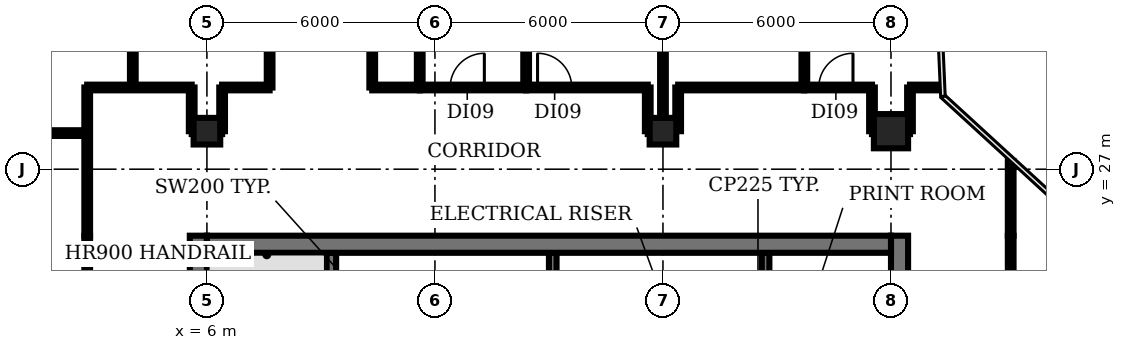
"""IFC4 building model, lengths in metres.
Left out: names, types, materials, properties, quantities, classifications, styles, units other than length and angle.
Written with IfcOpenShell. Run it as: python <this file> out.ifc"""

import sys

from ifc_helpers import new_model, si_unit, direction, frame, frame_2d, origin, origin_2d, place, context, subcontext, project, spatial, rectangle, circle, extrude, element, fill, save


model = new_model("IFC4")
c1 = context("Model", 3, precision=1e-05, world=origin(), true_north=direction((0.0, 1.0)))
c2 = subcontext(c1, "Body", "Model", "MODEL_VIEW")
j1 = project(units=[si_unit("LENGTHUNIT", "METRE"), si_unit("PLANEANGLEUNIT", "RADIAN")], contexts=[c1])
p1 = place(None, origin())
s1 = spatial("IfcSite", under=j1, at=p1, CompositionType="ELEMENT")
p2 = place(p1, origin())
s2 = spatial("IfcBuilding", under=s1, at=p2, CompositionType="ELEMENT")
p3 = place(p2, frame((0.0, 0.0, 218.0)))
s3 = spatial("IfcBuildingStorey", under=s2, at=p3, CompositionType="ELEMENT", Elevation=218.0)
for number, where, z_axis, x_axis in (
    (1, (6.0, 28.0, 0.0), (0.0, 0.0, 1.0), (1.0, 0.0, 0.0)),
    (2, (18.0, 28.0, 0.0), (0.0, 0.0, 1.0), (1.0, 0.0, 0.0)),
):
    element("IfcColumn", number, at=place(p3, frame(where, z_axis=z_axis, x_axis=x_axis)), inside=s3, PredefinedType="COLUMN", context=c2, shape_type="SweptSolid", body=[
        extrude(rectangle(XDim=0.7, YDim=0.7, at=origin_2d()), origin(), (0.0, 0.0, 1.0), 3.85),
    ])
p4 = place(p3, frame((24.0, 28.0, 0.0), z_axis=(0.0, 0.0, 1.0), x_axis=(1.0, 0.0, 0.0)))
e3 = element("IfcColumn", 3, at=p4, inside=s3, PredefinedType="COLUMN", context=c2, shape_type="SweptSolid", body=[
    extrude(circle(Radius=0.45, at=origin_2d()), origin(), (0.0, 0.0, 1.0), 3.85),
])
p5 = place(p3, frame((9.275, 18.375, 0.0), z_axis=(0.0, 0.0, 1.0), x_axis=(0.0, 1.0, 0.0)))
e4 = element("IfcWall", 4, at=p5, inside=s3, PredefinedType="SHEAR", context=c2, shape_type="SweptSolid", body=[
    extrude(rectangle(XDim=6.425, YDim=0.25, at=frame_2d((3.212, 0.0))), origin(), (0.0, 0.0, 1.0), 3.85),
])
for number, where, z_axis, x_axis in (
    (5, (15.1, 22.9, 0.0), (0.0, 0.0, 1.0), (0.0, 1.0, 0.0)),
    (6, (20.7, 22.9, 0.0), (0.0, 0.0, 1.0), (0.0, 1.0, 0.0)),
):
    element("IfcWall", number, at=place(p3, frame(where, z_axis=z_axis, x_axis=x_axis)), inside=s3, PredefinedType="SHEAR", context=c2, shape_type="SweptSolid", body=[
        extrude(rectangle(XDim=1.9, YDim=0.2, at=frame_2d((0.95, 0.0))), origin(), (0.0, 0.0, 1.0), 3.85),
    ])
p6 = place(p3, frame((5.775, 4.42, 0.0), z_axis=(0.0, 0.0, 1.0), x_axis=(0.0, 1.0, 0.0)))
e7 = element("IfcWall", 7, at=p6, inside=s3, PredefinedType="SHEAR", context=c2, shape_type="SweptSolid", body=[
    extrude(rectangle(XDim=20.83, YDim=0.45, at=frame_2d((10.415, 0.0))), origin(), (0.0, 0.0, 1.0), 3.85),
])
p7 = place(p6, frame((1.23, 0.0, 0.0)))
e8 = element("IfcOpeningElement", 8, at=p7, cuts=e7, PredefinedType="OPENING", context=c2, shape_type="SweptSolid", body=[
    extrude(rectangle(XDim=1.5, YDim=2.1, at=frame_2d((0.75, 1.05))), frame((0.0, 0.235, 0.0), z_axis=(0.0, -1.0, 0.0), x_axis=(1.0, 0.0, 0.0)), (0.0, 0.0, 1.0), 0.47),
])
p8 = place(p6, frame((7.68, 0.0, 0.0)))
e9 = element("IfcOpeningElement", 9, at=p8, cuts=e7, PredefinedType="OPENING", context=c2, shape_type="SweptSolid", body=[
    extrude(rectangle(XDim=1.2, YDim=2.1, at=frame_2d((0.6, 1.05))), frame((0.0, 0.235, 0.0), z_axis=(0.0, -1.0, 0.0), x_axis=(1.0, 0.0, 0.0)), (0.0, 0.0, 1.0), 0.47),
])
p9 = place(p6, frame((14.23, 0.0, 0.0)))
e10 = element("IfcOpeningElement", 10, at=p9, cuts=e7, PredefinedType="OPENING", context=c2, shape_type="SweptSolid", body=[
    extrude(rectangle(XDim=1.2, YDim=2.1, at=frame_2d((0.6, 1.05))), frame((0.0, 0.235, 0.0), z_axis=(0.0, -1.0, 0.0), x_axis=(1.0, 0.0, 0.0)), (0.0, 0.0, 1.0), 0.47),
])
p10 = place(p3, frame((24.225, 25.25, 0.0), z_axis=(0.0, 0.0, 1.0), x_axis=(0.0, -1.0, 0.0)))
e11 = element("IfcWall", 11, at=p10, inside=s3, PredefinedType="SHEAR", context=c2, shape_type="SweptSolid", body=[
    extrude(rectangle(XDim=20.83, YDim=0.45, at=frame_2d((10.415, 0.0))), origin(), (0.0, 0.0, 1.0), 3.85),
])
p11 = place(p10, frame((18.1, 0.0, 0.0)))
e12 = element("IfcOpeningElement", 12, at=p11, cuts=e11, PredefinedType="OPENING", context=c2, shape_type="SweptSolid", body=[
    extrude(rectangle(XDim=1.5, YDim=2.1, at=frame_2d((0.75, 1.05))), frame((0.0, 0.235, 0.0), z_axis=(0.0, -1.0, 0.0), x_axis=(1.0, 0.0, 0.0)), (0.0, 0.0, 1.0), 0.47),
])
p12 = place(p10, frame((12.0, 0.0, 0.0)))
e13 = element("IfcOpeningElement", 13, at=p12, cuts=e11, PredefinedType="OPENING", context=c2, shape_type="SweptSolid", body=[
    extrude(rectangle(XDim=0.9, YDim=2.1, at=frame_2d((0.45, 1.05))), frame((0.0, 0.235, 0.0), z_axis=(0.0, -1.0, 0.0), x_axis=(1.0, 0.0, 0.0)), (0.0, 0.0, 1.0), 0.47),
])
p13 = place(p10, frame((6.0, 0.0, 0.0)))
e14 = element("IfcOpeningElement", 14, at=p13, cuts=e11, PredefinedType="OPENING", context=c2, shape_type="SweptSolid", body=[
    extrude(rectangle(XDim=2.0, YDim=2.1, at=frame_2d((1.0, 1.05))), frame((0.0, 0.235, 0.0), z_axis=(0.0, -1.0, 0.0), x_axis=(1.0, 0.0, 0.0)), (0.0, 0.0, 1.0), 0.47),
])
p14 = place(p3, frame((6.0, 25.025, 0.0), z_axis=(0.0, 0.0, 1.0), x_axis=(1.0, 0.0, 0.0)))
e15 = element("IfcWall", 15, at=p14, inside=s3, PredefinedType="SHEAR", context=c2, shape_type="SweptSolid", body=[
    extrude(rectangle(XDim=18.0, YDim=0.45, at=frame_2d((9.0, 0.0))), origin(), (0.0, 0.0, 1.0), 3.85),
])
p15 = place(p3, frame((-0.965, 27.95, 0.0), z_axis=(0.0, 0.0, 1.0), x_axis=(1.0, 0.0, 0.0)))
e16 = element("IfcWall", 16, at=p15, inside=s3, PredefinedType="PARTITIONING", context=c2, shape_type="SweptSolid", body=[
    extrude(rectangle(XDim=3.815, YDim=0.15, at=frame_2d((1.908, 0.0))), origin(), (0.0, 0.0, 1.0), 2.88),
])
p16 = place(p3, frame((2.85, 5.77, 0.0), z_axis=(0.0, 0.0, 1.0), x_axis=(0.0, 1.0, 0.0)))
e17 = element("IfcWall", 17, at=p16, inside=s3, PredefinedType="PARTITIONING", context=c2, shape_type="SweptSolid", body=[
    extrude(rectangle(XDim=19.48, YDim=0.15, at=frame_2d((9.74, 0.0))), origin(), (0.0, 0.0, 1.0), 2.88),
])
p17 = place(p16, frame((8.48, 0.0, 0.0)))
e18 = element("IfcOpeningElement", 18, at=p17, cuts=e17, PredefinedType="OPENING", context=c2, shape_type="SweptSolid", body=[
    extrude(rectangle(XDim=1.2, YDim=2.1, at=frame_2d((0.6, 1.05))), frame((0.0, 0.085, 0.0), z_axis=(0.0, -1.0, 0.0), x_axis=(1.0, 0.0, 0.0)), (0.0, 0.0, 1.0), 0.17),
])
p18 = place(p3, frame((2.85, 25.25, 0.0), z_axis=(0.0, 0.0, 1.0), x_axis=(0.0, 1.0, 0.0)))
e19 = element("IfcWall", 19, at=p18, inside=s3, PredefinedType="PARTITIONING", context=c2, shape_type="SweptSolid", body=[
    extrude(rectangle(XDim=3.9, YDim=0.15, at=frame_2d((1.95, 0.0))), origin(), (0.0, 0.0, 1.0), 2.88),
])
p19 = place(p3, frame((2.85, 29.15, 0.0), z_axis=(0.0, 0.0, 1.0), x_axis=(1.0, 0.0, 0.0)))
e20 = element("IfcWall", 20, at=p19, inside=s3, PredefinedType="PARTITIONING", context=c2, shape_type="SweptSolid", body=[
    extrude(rectangle(XDim=2.75, YDim=0.15, at=frame_2d((1.375, 0.0))), origin(), (0.0, 0.0, 1.0), 2.88),
])
p20 = place(p3, frame((4.05, 29.15, 0.0), z_axis=(0.0, 0.0, 1.0), x_axis=(0.0, 1.0, 0.0)))
e21 = element("IfcWall", 21, at=p20, inside=s3, PredefinedType="PARTITIONING", context=c2, shape_type="SweptSolid", body=[
    extrude(rectangle(XDim=4.8, YDim=0.15, at=frame_2d((2.4, 0.0))), origin(), (0.0, 0.0, 1.0), 2.88),
])
p21 = place(p3, frame((5.6, 28.0, 0.0), z_axis=(0.0, 0.0, 1.0), x_axis=(0.0, 1.0, 0.0)))
e22 = element("IfcWall", 22, at=p21, inside=s3, PredefinedType="PARTITIONING", context=c2, shape_type="SweptSolid", body=[
    extrude(rectangle(XDim=1.15, YDim=0.15, at=frame_2d((0.575, 0.0))), origin(), (0.0, 0.0, 1.0), 2.88),
])
p22 = place(p3, frame((5.6, 28.0, 0.0), z_axis=(0.0, 0.0, 1.0), x_axis=(1.0, 0.0, 0.0)))
e23 = element("IfcWall", 23, at=p22, inside=s3, PredefinedType="PARTITIONING", context=c2, shape_type="SweptSolid", body=[
    extrude(rectangle(XDim=0.8, YDim=0.15, at=frame_2d((0.4, 0.0))), origin(), (0.0, 0.0, 1.0), 2.88),
])
p23 = place(p3, frame((6.4, 28.0, 0.0), z_axis=(0.0, 0.0, 1.0), x_axis=(0.0, 1.0, 0.0)))
e24 = element("IfcWall", 24, at=p23, inside=s3, PredefinedType="PARTITIONING", context=c2, shape_type="SweptSolid", body=[
    extrude(rectangle(XDim=1.15, YDim=0.15, at=frame_2d((0.575, 0.0))), origin(), (0.0, 0.0, 1.0), 2.88),
])
p24 = place(p3, frame((6.4, 29.15, 0.0), z_axis=(0.0, 0.0, 1.0), x_axis=(1.0, 0.0, 0.0)))
e25 = element("IfcWall", 25, at=p24, inside=s3, PredefinedType="PARTITIONING", context=c2, shape_type="SweptSolid", body=[
    extrude(rectangle(XDim=1.25, YDim=0.15, at=frame_2d((0.625, 0.0))), origin(), (0.0, 0.0, 1.0), 2.88),
])
p25 = place(p3, frame((7.65, 29.15, 0.0), z_axis=(0.0, 0.0, 1.0), x_axis=(0.0, 1.0, 0.0)))
e26 = element("IfcWall", 26, at=p25, inside=s3, PredefinedType="PARTITIONING", context=c2, shape_type="SweptSolid", body=[
    extrude(rectangle(XDim=4.8, YDim=0.15, at=frame_2d((2.4, 0.0))), origin(), (0.0, 0.0, 1.0), 2.88),
])
p26 = place(p25, frame((1.9, 0.0, 0.0)))
e27 = element("IfcOpeningElement", 27, at=p26, cuts=e26, PredefinedType="OPENING", context=c2, shape_type="SweptSolid", body=[
    extrude(rectangle(XDim=0.9, YDim=2.1, at=frame_2d((0.45, 1.05))), frame((0.0, 0.085, 0.0), z_axis=(0.0, -1.0, 0.0), x_axis=(1.0, 0.0, 0.0)), (0.0, 0.0, 1.0), 0.17),
])
p27 = place(p3, frame((10.35, 29.15, 0.0), z_axis=(0.0, 0.0, 1.0), x_axis=(0.0, 1.0, 0.0)))
e28 = element("IfcWall", 28, at=p27, inside=s3, PredefinedType="PARTITIONING", context=c2, shape_type="SweptSolid", body=[
    extrude(rectangle(XDim=4.8, YDim=0.15, at=frame_2d((2.4, 0.0))), origin(), (0.0, 0.0, 1.0), 2.88),
])
p28 = place(p3, frame((10.35, 29.15, 0.0), z_axis=(0.0, 0.0, 1.0), x_axis=(1.0, 0.0, 0.0)))
e29 = element("IfcWall", 29, at=p28, inside=s3, PredefinedType="PARTITIONING", context=c2, shape_type="SweptSolid", body=[
    extrude(rectangle(XDim=1.25, YDim=0.15, at=frame_2d((0.625, 0.0))), origin(), (0.0, 0.0, 1.0), 2.88),
])
p29 = place(p3, frame((11.6, 29.15, 0.0), z_axis=(0.0, 0.0, 1.0), x_axis=(0.0, 1.0, 0.0)))
e30 = element("IfcWall", 30, at=p29, inside=s3, PredefinedType="PARTITIONING", context=c2, shape_type="SweptSolid", body=[
    extrude(rectangle(XDim=4.72, YDim=0.15, at=frame_2d((2.36, 0.0))), origin(), (0.0, 0.0, 1.0), 2.88),
])
p30 = place(p3, frame((11.6, 29.15, 0.0), z_axis=(0.0, 0.0, 1.0), x_axis=(1.0, 0.0, 0.0)))
e31 = element("IfcWall", 31, at=p30, inside=s3, PredefinedType="PARTITIONING", context=c2, shape_type="SweptSolid", body=[
    extrude(rectangle(XDim=2.8, YDim=0.15, at=frame_2d((1.4, 0.0))), origin(), (0.0, 0.0, 1.0), 2.88),
])
p31 = place(p30, frame((0.8, 0.0, 0.0)))
e32 = element("IfcOpeningElement", 32, at=p31, cuts=e31, PredefinedType="OPENING", context=c2, shape_type="SweptSolid", body=[
    extrude(rectangle(XDim=0.9, YDim=2.1, at=frame_2d((0.45, 1.05))), frame((0.0, 0.085, 0.0), z_axis=(0.0, -1.0, 0.0), x_axis=(1.0, 0.0, 0.0)), (0.0, 0.0, 1.0), 0.17),
])
p32 = place(p3, frame((14.4, 29.15, 0.0), z_axis=(0.0, 0.0, 1.0), x_axis=(0.0, 1.0, 0.0)))
e33 = element("IfcWall", 33, at=p32, inside=s3, PredefinedType="PARTITIONING", context=c2, shape_type="SweptSolid", body=[
    extrude(rectangle(XDim=4.8, YDim=0.15, at=frame_2d((2.4, 0.0))), origin(), (0.0, 0.0, 1.0), 2.88),
])
p33 = place(p3, frame((14.4, 29.15, 0.0), z_axis=(0.0, 0.0, 1.0), x_axis=(1.0, 0.0, 0.0)))
e34 = element("IfcWall", 34, at=p33, inside=s3, PredefinedType="PARTITIONING", context=c2, shape_type="SweptSolid", body=[
    extrude(rectangle(XDim=3.2, YDim=0.15, at=frame_2d((1.6, 0.0))), origin(), (0.0, 0.0, 1.0), 2.88),
])
p34 = place(p33, frame((0.3, 0.0, 0.0)))
e35 = element("IfcOpeningElement", 35, at=p34, cuts=e34, PredefinedType="OPENING", context=c2, shape_type="SweptSolid", body=[
    extrude(rectangle(XDim=0.9, YDim=2.1, at=frame_2d((0.45, 1.05))), frame((0.0, 0.085, 0.0), z_axis=(0.0, -1.0, 0.0), x_axis=(1.0, 0.0, 0.0)), (0.0, 0.0, 1.0), 0.17),
])
p35 = place(p3, frame((17.6, 28.0, 0.0), z_axis=(0.0, 0.0, 1.0), x_axis=(0.0, 1.0, 0.0)))
e36 = element("IfcWall", 36, at=p35, inside=s3, PredefinedType="PARTITIONING", context=c2, shape_type="SweptSolid", body=[
    extrude(rectangle(XDim=1.15, YDim=0.15, at=frame_2d((0.575, 0.0))), origin(), (0.0, 0.0, 1.0), 2.88),
])
p36 = place(p3, frame((17.6, 28.0, 0.0), z_axis=(0.0, 0.0, 1.0), x_axis=(1.0, 0.0, 0.0)))
e37 = element("IfcWall", 37, at=p36, inside=s3, PredefinedType="PARTITIONING", context=c2, shape_type="SweptSolid", body=[
    extrude(rectangle(XDim=0.4, YDim=0.15, at=frame_2d((0.2, 0.0))), origin(), (0.0, 0.0, 1.0), 2.88),
])
p37 = place(p3, frame((18.0, 28.0, 0.0), z_axis=(0.0, 0.0, 1.0), x_axis=(0.0, 1.0, 0.0)))
e38 = element("IfcWall", 38, at=p37, inside=s3, PredefinedType="PARTITIONING", context=c2, shape_type="SweptSolid", body=[
    extrude(rectangle(XDim=5.95, YDim=0.15, at=frame_2d((2.975, 0.0))), origin(), (0.0, 0.0, 1.0), 2.88),
])
p38 = place(p3, frame((18.4, 28.0, 0.0), z_axis=(0.0, 0.0, 1.0), x_axis=(0.0, 1.0, 0.0)))
e39 = element("IfcWall", 39, at=p38, inside=s3, PredefinedType="PARTITIONING", context=c2, shape_type="SweptSolid", body=[
    extrude(rectangle(XDim=1.15, YDim=0.15, at=frame_2d((0.575, 0.0))), origin(), (0.0, 0.0, 1.0), 2.88),
])
p39 = place(p3, frame((18.4, 29.15, 0.0), z_axis=(0.0, 0.0, 1.0), x_axis=(1.0, 0.0, 0.0)))
e40 = element("IfcWall", 40, at=p39, inside=s3, PredefinedType="PARTITIONING", context=c2, shape_type="SweptSolid", body=[
    extrude(rectangle(XDim=3.32, YDim=0.15, at=frame_2d((1.66, 0.0))), origin(), (0.0, 0.0, 1.0), 2.88),
])
p40 = place(p3, frame((21.72, 29.15, 0.0), z_axis=(0.0, 0.0, 1.0), x_axis=(0.0, 1.0, 0.0)))
e41 = element("IfcWall", 41, at=p40, inside=s3, PredefinedType="PARTITIONING", context=c2, shape_type="SweptSolid", body=[
    extrude(rectangle(XDim=4.8, YDim=0.15, at=frame_2d((2.4, 0.0))), origin(), (0.0, 0.0, 1.0), 2.88),
])
p41 = place(p3, frame((21.72, 29.15, 0.0), z_axis=(0.0, 0.0, 1.0), x_axis=(1.0, 0.0, 0.0)))
e42 = element("IfcWall", 42, at=p41, inside=s3, PredefinedType="PARTITIONING", context=c2, shape_type="SweptSolid", body=[
    extrude(rectangle(XDim=1.78, YDim=0.15, at=frame_2d((0.89, 0.0))), origin(), (0.0, 0.0, 1.0), 2.88),
])
p42 = place(p41, frame((0.38, 0.0, 0.0)))
e43 = element("IfcOpeningElement", 43, at=p42, cuts=e42, PredefinedType="OPENING", context=c2, shape_type="SweptSolid", body=[
    extrude(rectangle(XDim=0.9, YDim=2.1, at=frame_2d((0.45, 1.05))), frame((0.0, 0.085, 0.0), z_axis=(0.0, -1.0, 0.0), x_axis=(1.0, 0.0, 0.0)), (0.0, 0.0, 1.0), 0.17),
])
p43 = place(p3, frame((23.5, 28.0, 0.0), z_axis=(0.0, 0.0, 1.0), x_axis=(0.0, 1.0, 0.0)))
e44 = element("IfcWall", 44, at=p43, inside=s3, PredefinedType="PARTITIONING", context=c2, shape_type="SweptSolid", body=[
    extrude(rectangle(XDim=1.15, YDim=0.15, at=frame_2d((0.575, 0.0))), origin(), (0.0, 0.0, 1.0), 2.88),
])
p44 = place(p3, frame((23.5, 28.0, 0.0), z_axis=(0.0, 0.0, 1.0), x_axis=(1.0, 0.0, 0.0)))
e45 = element("IfcWall", 45, at=p44, inside=s3, PredefinedType="PARTITIONING", context=c2, shape_type="SweptSolid", body=[
    extrude(rectangle(XDim=1.0, YDim=0.15, at=frame_2d((0.5, 0.0))), origin(), (0.0, 0.0, 1.0), 2.88),
])
p45 = place(p3, frame((24.5, 28.0, 0.0), z_axis=(0.0, 0.0, 1.0), x_axis=(0.0, 1.0, 0.0)))
e46 = element("IfcWall", 46, at=p45, inside=s3, PredefinedType="PARTITIONING", context=c2, shape_type="SweptSolid", body=[
    extrude(rectangle(XDim=1.15, YDim=0.15, at=frame_2d((0.575, 0.0))), origin(), (0.0, 0.0, 1.0), 2.88),
])
p46 = place(p3, frame((24.5, 29.15, 0.0), z_axis=(0.0, 0.0, 1.0), x_axis=(1.0, 0.0, 0.0)))
e47 = element("IfcWall", 47, at=p46, inside=s3, PredefinedType="PARTITIONING", context=c2, shape_type="SweptSolid", body=[
    extrude(rectangle(XDim=0.796, YDim=0.15, at=frame_2d((0.398, 0.0))), origin(), (0.0, 0.0, 1.0), 2.88),
])
p47 = place(p3, frame((27.15, 25.25, 0.0), z_axis=(0.0, 0.0, 1.0), x_axis=(0.0, -1.0, 0.0)))
e48 = element("IfcWall", 48, at=p47, inside=s3, PredefinedType="PARTITIONING", context=c2, shape_type="SweptSolid", body=[
    extrude(rectangle(XDim=4.85, YDim=0.15, at=frame_2d((2.425, 0.0))), origin(), (0.0, 0.0, 1.0), 2.88),
])
p48 = place(p47, frame((1.55, 0.0, 0.0)))
e49 = element("IfcOpeningElement", 49, at=p48, cuts=e48, PredefinedType="OPENING", context=c2, shape_type="SweptSolid", body=[
    extrude(rectangle(XDim=1.0, YDim=2.1, at=frame_2d((0.5, 1.05))), frame((0.0, 0.085, 0.0), z_axis=(0.0, -1.0, 0.0), x_axis=(1.0, 0.0, 0.0)), (0.0, 0.0, 1.0), 0.17),
])
p49 = place(p3, frame((27.15, 25.25, 0.0), z_axis=(0.0, 0.0, 1.0), x_axis=(0.0, 1.0, 0.0)))
e50 = element("IfcWall", 50, at=p49, inside=s3, PredefinedType="PARTITIONING", context=c2, shape_type="SweptSolid", body=[
    extrude(rectangle(XDim=1.96, YDim=0.15, at=frame_2d((0.98, 0.0))), origin(), (0.0, 0.0, 1.0), 2.88),
])
p50 = place(p31, origin())
e51 = element("IfcDoor", 51, at=p50, inside=s3, OperationType="SINGLE_SWING_RIGHT", PredefinedType="DOOR", context=c2, shape_type="SweptSolid", body=[
    extrude(rectangle(XDim=0.9, YDim=2.1, at=frame_2d((0.45, 1.05))), frame((0.0, 0.025, 0.0), z_axis=(0.0, -1.0, 0.0), x_axis=(1.0, 0.0, 0.0)), (0.0, 0.0, 1.0), 0.05),
])
fill(e32, e51)
p51 = place(p34, origin())
e52 = element("IfcDoor", 52, at=p51, inside=s3, OperationType="SINGLE_SWING_LEFT", PredefinedType="DOOR", context=c2, shape_type="SweptSolid", body=[
    extrude(rectangle(XDim=0.9, YDim=2.1, at=frame_2d((0.45, 1.05))), frame((0.0, 0.025, 0.0), z_axis=(0.0, -1.0, 0.0), x_axis=(1.0, 0.0, 0.0)), (0.0, 0.0, 1.0), 0.05),
])
fill(e35, e52)
p52 = place(p42, origin())
e53 = element("IfcDoor", 53, at=p52, inside=s3, OperationType="SINGLE_SWING_RIGHT", PredefinedType="DOOR", context=c2, shape_type="SweptSolid", body=[
    extrude(rectangle(XDim=0.9, YDim=2.1, at=frame_2d((0.45, 1.05))), frame((0.0, 0.025, 0.0), z_axis=(0.0, -1.0, 0.0), x_axis=(1.0, 0.0, 0.0)), (0.0, 0.0, 1.0), 0.05),
])
fill(e43, e53)
save(model, sys.argv[1])
